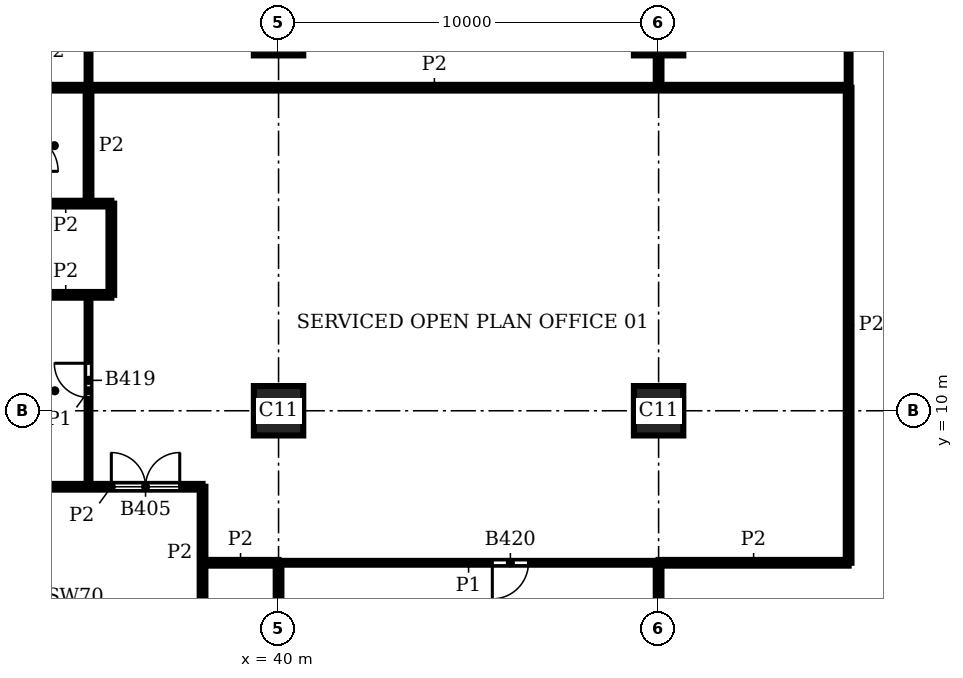
"""IFC4 building model, lengths in metres.
Left out: names, types, materials, properties, quantities, classifications, styles, units other than length and angle.
Written with IfcOpenShell. Run it as: python <this file> out.ifc"""

import sys

from ifc_helpers import new_model, si_unit, direction, frame, frame_2d, origin, origin_2d, place, context, subcontext, project, spatial, rectangle, extrude, element, fill, save


model = new_model("IFC4")
c1 = context("Model", 3, precision=1e-05, world=origin(), true_north=direction((0.0, 1.0)))
c2 = subcontext(c1, "Body", "Model", "MODEL_VIEW")
j1 = project(units=[si_unit("LENGTHUNIT", "METRE"), si_unit("PLANEANGLEUNIT", "RADIAN")], contexts=[c1])
p1 = place(None, origin())
s1 = spatial("IfcSite", under=j1, at=p1, CompositionType="ELEMENT")
p2 = place(p1, origin())
s2 = spatial("IfcBuilding", under=s1, at=p2, CompositionType="ELEMENT")
p3 = place(p2, frame((0.0, 0.0, 170.7)))
s3 = spatial("IfcBuildingStorey", under=s2, at=p3, CompositionType="ELEMENT", Elevation=170.7)
for number, where, z_axis, x_axis in (
    (1, (40.0, 10.0, 0.0), (0.0, 0.0, 1.0), (1.0, 0.0, 0.0)),
    (2, (40.0, 20.0, 0.0), (0.0, 0.0, 1.0), (1.0, 0.0, 0.0)),
    (3, (50.0, 10.0, 0.0), (0.0, 0.0, 1.0), (1.0, 0.0, 0.0)),
    (4, (50.0, 20.0, 0.0), (0.0, 0.0, 1.0), (1.0, 0.0, 0.0)),
):
    element("IfcColumn", number, at=place(p3, frame(where, z_axis=z_axis, x_axis=x_axis)), inside=s3, PredefinedType="COLUMN", context=c2, shape_type="SweptSolid", body=[
        extrude(rectangle(XDim=1.3, YDim=1.3, at=origin_2d()), origin(), (0.0, 0.0, 1.0), 3.9),
    ])
p4 = place(p3, frame((35.0, 8.0, 0.0), z_axis=(0.0, 0.0, 1.0), x_axis=(0.0, 1.0, 0.0)))
e5 = element("IfcWall", 5, at=p4, inside=s3, PredefinedType="PARTITIONING", context=c2, shape_type="SweptSolid", body=[
    extrude(rectangle(XDim=5.05, YDim=0.1, at=frame_2d((2.525, 0.0))), origin(), (0.0, 0.0, 1.0), 3.58),
])
p5 = place(p4, frame((2.35, 0.0, 0.0)))
e6 = element("IfcOpeningElement", 6, at=p5, cuts=e5, PredefinedType="OPENING", context=c2, shape_type="SweptSolid", body=[
    extrude(rectangle(XDim=0.9, YDim=2.1, at=frame_2d((0.45, 1.05))), frame((0.0, 0.06, 0.0), z_axis=(0.0, -1.0, 0.0), x_axis=(1.0, 0.0, 0.0)), (0.0, 0.0, 1.0), 0.12),
])
p6 = place(p3, frame((35.0, 18.5, 0.0), z_axis=(0.0, 0.0, 1.0), x_axis=(0.0, 1.0, 0.0)))
e7 = element("IfcWall", 7, at=p6, inside=s3, PredefinedType="PARTITIONING", context=c2, shape_type="SweptSolid", body=[
    extrude(rectangle(XDim=7.5, YDim=0.1, at=frame_2d((3.75, 0.0))), origin(), (0.0, 0.0, 1.0), 3.58),
])
p7 = place(p6, frame((3.125, 0.0, 0.0)))
e8 = element("IfcOpeningElement", 8, at=p7, cuts=e7, PredefinedType="OPENING", context=c2, shape_type="SweptSolid", body=[
    extrude(rectangle(XDim=0.95, YDim=2.1, at=frame_2d((0.475, 1.05))), frame((0.0, 0.06, 0.0), z_axis=(0.0, -1.0, 0.0), x_axis=(1.0, 0.0, 0.0)), (0.0, 0.0, 1.0), 0.12),
])
p8 = place(p3, frame((55.0, 18.5, 0.0), z_axis=(0.0, 0.0, 1.0), x_axis=(0.0, 1.0, 0.0)))
e9 = element("IfcWall", 9, at=p8, inside=s3, PredefinedType="PARTITIONING", context=c2, shape_type="SweptSolid", body=[
    extrude(rectangle(XDim=7.5, YDim=0.1, at=frame_2d((3.75, 0.0))), origin(), (0.0, 0.0, 1.0), 3.58),
])
p9 = place(p8, frame((3.625, 0.0, 0.0)))
e10 = element("IfcOpeningElement", 10, at=p9, cuts=e9, PredefinedType="OPENING", context=c2, shape_type="SweptSolid", body=[
    extrude(rectangle(XDim=0.95, YDim=2.1, at=frame_2d((0.475, 1.05))), frame((0.0, 0.06, 0.0), z_axis=(0.0, -1.0, 0.0), x_axis=(1.0, 0.0, 0.0)), (0.0, 0.0, 1.0), 0.12),
])
p10 = place(p3, frame((40.0, 6.0, 0.0), z_axis=(0.0, 0.0, 1.0), x_axis=(1.0, 0.0, 0.0)))
e11 = element("IfcWall", 11, at=p10, inside=s3, PredefinedType="PARTITIONING", context=c2, shape_type="SweptSolid", body=[
    extrude(rectangle(XDim=10.0, YDim=0.1, at=frame_2d((5.0, 0.0))), origin(), (0.0, 0.0, 1.0), 3.58),
])
p11 = place(p10, frame((5.625, 0.0, 0.0)))
e12 = element("IfcOpeningElement", 12, at=p11, cuts=e11, PredefinedType="OPENING", context=c2, shape_type="SweptSolid", body=[
    extrude(rectangle(XDim=0.95, YDim=2.1, at=frame_2d((0.475, 1.05))), frame((0.0, 0.06, 0.0), z_axis=(0.0, -1.0, 0.0), x_axis=(1.0, 0.0, 0.0)), (0.0, 0.0, 1.0), 0.12),
])
p12 = place(p3, frame((35.0, 15.45, 0.0), z_axis=(0.0, 0.0, 1.0), x_axis=(0.0, 1.0, 0.0)))
e13 = element("IfcWall", 13, at=p12, inside=s3, PredefinedType="PARTITIONING", context=c2, shape_type="SweptSolid", body=[
    extrude(rectangle(XDim=3.05, YDim=0.15, at=frame_2d((1.525, 0.0))), origin(), (0.0, 0.0, 1.0), 3.58),
])
p13 = place(p3, frame((35.6, 13.05, 0.0), z_axis=(0.0, 0.0, 1.0), x_axis=(0.0, 1.0, 0.0)))
e14 = element("IfcWall", 14, at=p13, inside=s3, PredefinedType="PARTITIONING", context=c2, shape_type="SweptSolid", body=[
    extrude(rectangle(XDim=2.4, YDim=0.15, at=frame_2d((1.2, 0.0))), origin(), (0.0, 0.0, 1.0), 3.58),
])
p14 = place(p3, frame((38.0, 4.5, 0.0), z_axis=(0.0, 0.0, 1.0), x_axis=(0.0, 1.0, 0.0)))
e15 = element("IfcWall", 15, at=p14, inside=s3, PredefinedType="PARTITIONING", context=c2, shape_type="SweptSolid", body=[
    extrude(rectangle(XDim=3.5, YDim=0.15, at=frame_2d((1.75, 0.0))), origin(), (0.0, 0.0, 1.0), 3.58),
])
for number, where, z_axis, x_axis in (
    (16, (40.0, 0.45, 0.0), (0.0, 0.0, 1.0), (0.0, 1.0, 0.0)),
    (17, (50.0, 0.45, 0.0), (0.0, 0.0, 1.0), (0.0, 1.0, 0.0)),
):
    element("IfcWall", number, at=place(p3, frame(where, z_axis=z_axis, x_axis=x_axis)), inside=s3, PredefinedType="PARTITIONING", context=c2, shape_type="SweptSolid", body=[
        extrude(rectangle(XDim=5.55, YDim=0.15, at=frame_2d((2.775, 0.0))), origin(), (0.0, 0.0, 1.0), 3.58),
    ])
p15 = place(p3, frame((50.0, 18.5, 0.0), z_axis=(0.0, 0.0, 1.0), x_axis=(0.0, 1.0, 0.0)))
e18 = element("IfcWall", 18, at=p15, inside=s3, PredefinedType="PARTITIONING", context=c2, shape_type="SweptSolid", body=[
    extrude(rectangle(XDim=0.85, YDim=0.15, at=frame_2d((0.425, 0.0))), origin(), (0.0, 0.0, 1.0), 3.58),
])
p16 = place(p3, frame((55.0, 6.0, 0.0), z_axis=(0.0, 0.0, 1.0), x_axis=(0.0, 1.0, 0.0)))
e19 = element("IfcWall", 19, at=p16, inside=s3, PredefinedType="PARTITIONING", context=c2, shape_type="SweptSolid", body=[
    extrude(rectangle(XDim=12.5, YDim=0.15, at=frame_2d((6.25, 0.0))), origin(), (0.0, 0.0, 1.0), 3.58),
])
p17 = place(p3, frame((38.0, 6.0, 0.0), z_axis=(0.0, 0.0, 1.0), x_axis=(1.0, 0.0, 0.0)))
e20 = element("IfcWall", 20, at=p17, inside=s3, PredefinedType="PARTITIONING", context=c2, shape_type="SweptSolid", body=[
    extrude(rectangle(XDim=2.0, YDim=0.15, at=frame_2d((1.0, 0.0))), origin(), (0.0, 0.0, 1.0), 3.58),
])
p18 = place(p3, frame((50.0, 6.0, 0.0), z_axis=(0.0, 0.0, 1.0), x_axis=(1.0, 0.0, 0.0)))
e21 = element("IfcWall", 21, at=p18, inside=s3, PredefinedType="PARTITIONING", context=c2, shape_type="SweptSolid", body=[
    extrude(rectangle(XDim=5.0, YDim=0.15, at=frame_2d((2.5, 0.0))), origin(), (0.0, 0.0, 1.0), 3.58),
])
p19 = place(p3, frame((33.2, 8.0, 0.0), z_axis=(0.0, 0.0, 1.0), x_axis=(1.0, 0.0, 0.0)))
e22 = element("IfcWall", 22, at=p19, inside=s3, PredefinedType="PARTITIONING", context=c2, shape_type="SweptSolid", body=[
    extrude(rectangle(XDim=4.8, YDim=0.15, at=frame_2d((2.4, 0.0))), origin(), (0.0, 0.0, 1.0), 3.58),
])
p20 = place(p19, frame((2.4, 0.0, 0.0)))
e23 = element("IfcOpeningElement", 23, at=p20, cuts=e22, PredefinedType="OPENING", context=c2, shape_type="SweptSolid", body=[
    extrude(rectangle(XDim=1.8, YDim=2.1, at=frame_2d((0.9, 1.05))), frame((0.0, 0.085, 0.0), z_axis=(0.0, -1.0, 0.0), x_axis=(1.0, 0.0, 0.0)), (0.0, 0.0, 1.0), 0.17),
])
for number, where, z_axis, x_axis in (
    (24, (33.2, 13.05, 0.0), (0.0, 0.0, 1.0), (1.0, 0.0, 0.0)),
    (25, (33.2, 15.45, 0.0), (0.0, 0.0, 1.0), (1.0, 0.0, 0.0)),
):
    element("IfcWall", number, at=place(p3, frame(where, z_axis=z_axis, x_axis=x_axis)), inside=s3, PredefinedType="PARTITIONING", context=c2, shape_type="SweptSolid", body=[
        extrude(rectangle(XDim=2.4, YDim=0.15, at=frame_2d((1.2, 0.0))), origin(), (0.0, 0.0, 1.0), 3.58),
    ])
p21 = place(p3, frame((33.2, 18.5, 0.0), z_axis=(0.0, 0.0, 1.0), x_axis=(1.0, 0.0, 0.0)))
e26 = element("IfcWall", 26, at=p21, inside=s3, PredefinedType="PARTITIONING", context=c2, shape_type="SweptSolid", body=[
    extrude(rectangle(XDim=21.8, YDim=0.15, at=frame_2d((10.9, 0.0))), origin(), (0.0, 0.0, 1.0), 3.58),
])
p22 = place(p20, origin())
e27 = element("IfcDoor", 27, at=p22, inside=s3, OperationType="DOUBLE_DOOR_SINGLE_SWING", PredefinedType="DOOR", context=c2, shape_type="SweptSolid", body=[
    extrude(rectangle(XDim=1.8, YDim=2.1, at=frame_2d((0.9, 1.05))), frame((0.0, 0.025, 0.0), z_axis=(0.0, -1.0, 0.0), x_axis=(1.0, 0.0, 0.0)), (0.0, 0.0, 1.0), 0.05),
])
fill(e23, e27)
p23 = place(p5, origin())
e28 = element("IfcDoor", 28, at=p23, inside=s3, OperationType="SINGLE_SWING_RIGHT", PredefinedType="DOOR", context=c2, shape_type="SweptSolid", body=[
    extrude(rectangle(XDim=0.9, YDim=2.1, at=frame_2d((0.45, 1.05))), frame((0.0, 0.025, 0.0), z_axis=(0.0, -1.0, 0.0), x_axis=(1.0, 0.0, 0.0)), (0.0, 0.0, 1.0), 0.05),
])
fill(e6, e28)
p24 = place(p11, frame((0.95, 0.0, 0.0), z_axis=(0.0, 0.0, 1.0), x_axis=(-1.0, 0.0, 0.0)))
e29 = element("IfcDoor", 29, at=p24, inside=s3, OperationType="SINGLE_SWING_RIGHT", PredefinedType="DOOR", context=c2, shape_type="SweptSolid", body=[
    extrude(rectangle(XDim=0.95, YDim=2.1, at=frame_2d((0.475, 1.05))), frame((0.0, 0.025, 0.0), z_axis=(0.0, -1.0, 0.0), x_axis=(1.0, 0.0, 0.0)), (0.0, 0.0, 1.0), 0.05),
])
fill(e12, e29)
save(model, sys.argv[1])
